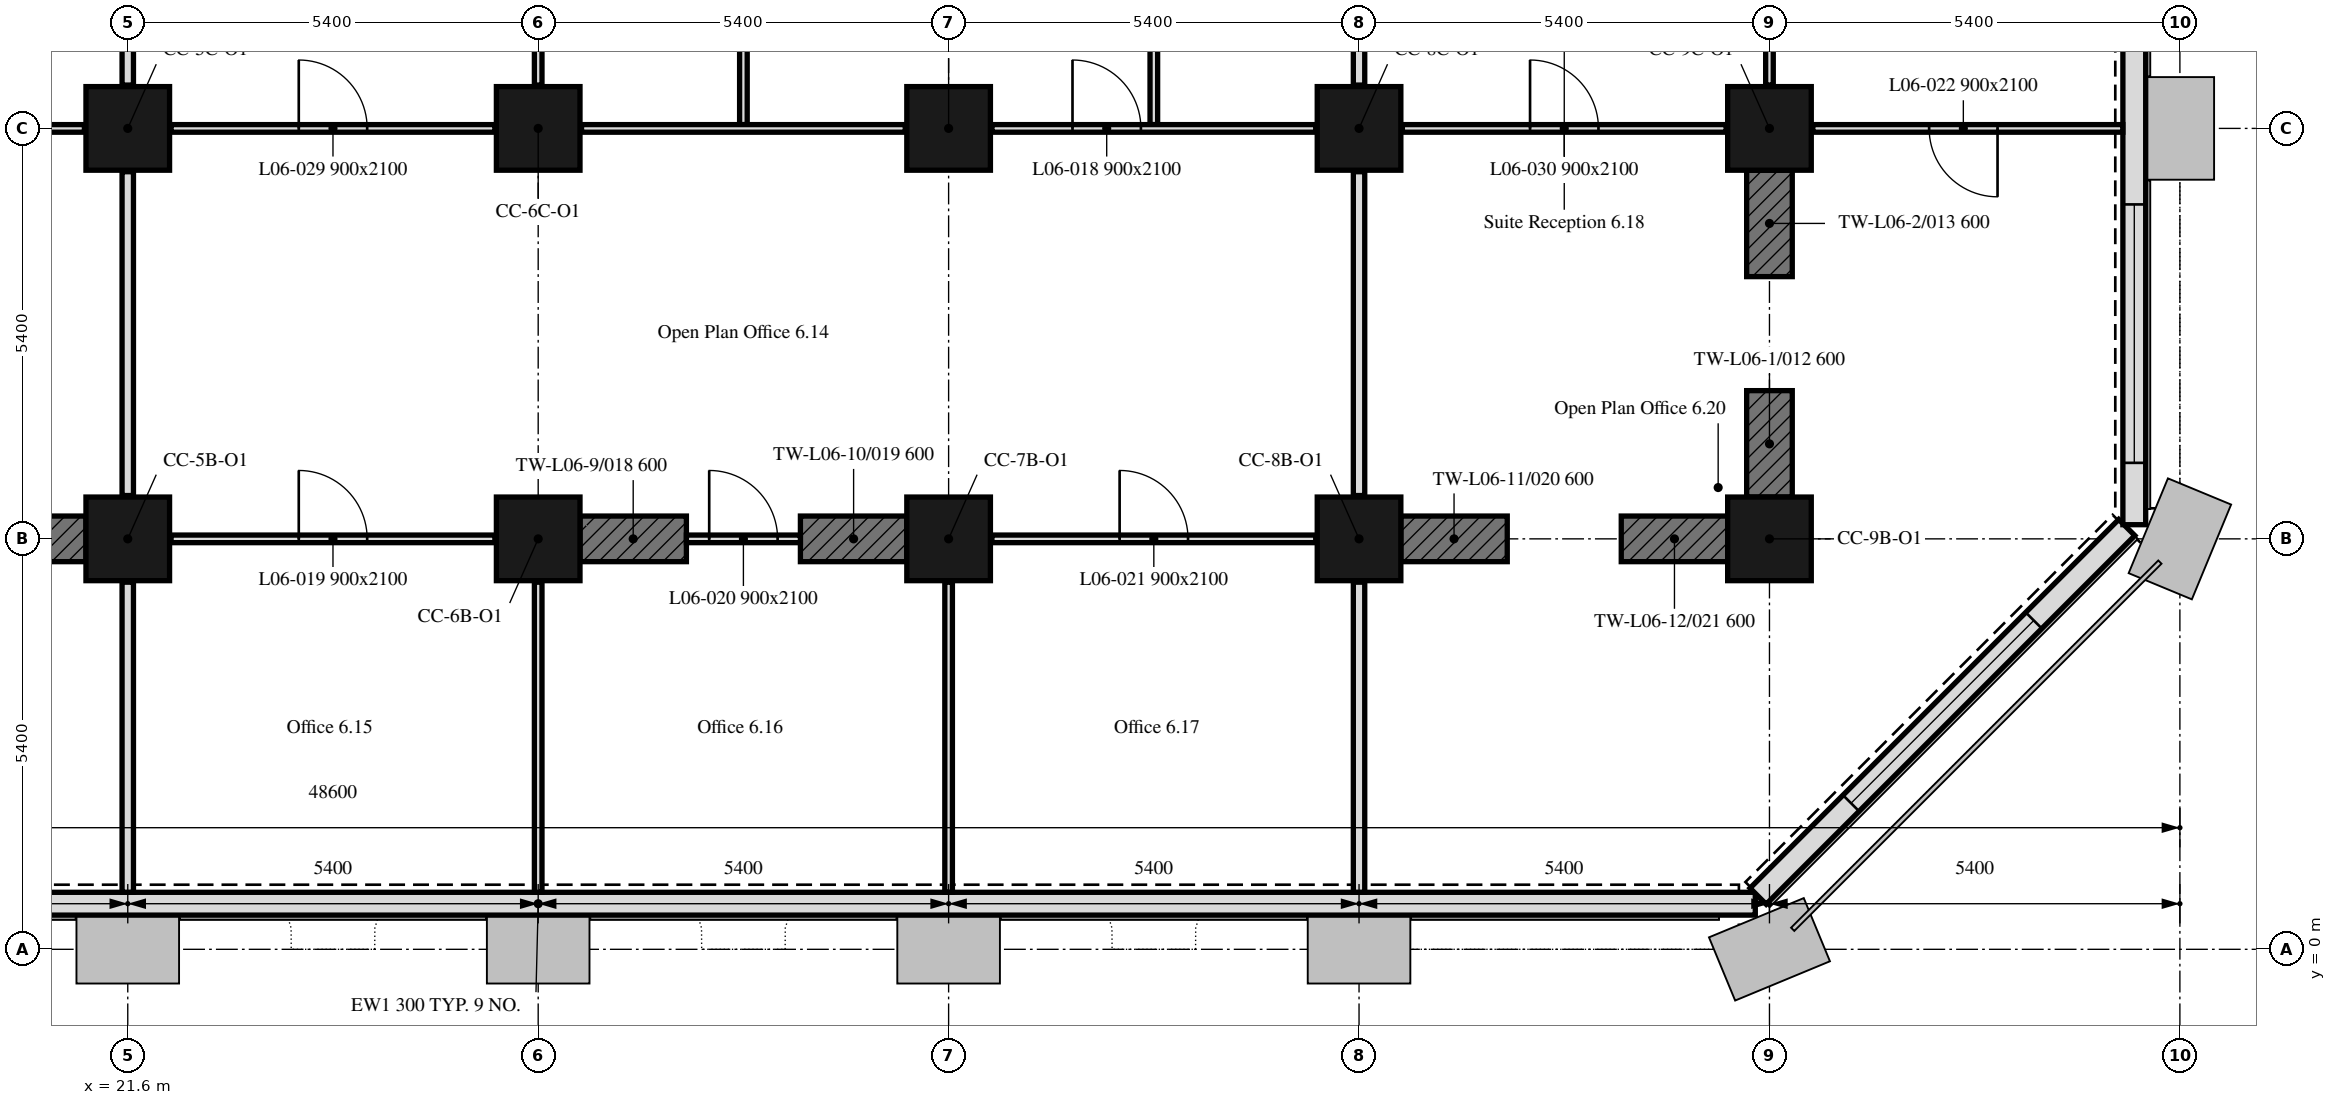
"""IFC4 building model, lengths in metres.
Left out: names, types, materials, properties, quantities, classifications, styles, units other than length and angle.
Written with IfcOpenShell. Run it as: python <this file> out.ifc"""

import sys

from ifc_helpers import new_model, si_unit, direction, frame, frame_2d, origin, origin_2d, place, context, subcontext, project, spatial, rectangle, extrude, element, fill, save


model = new_model("IFC4")
c1 = context("Model", 3, precision=1e-05, world=origin(), true_north=direction((0.0, 1.0)))
c2 = subcontext(c1, "Body", "Model", "MODEL_VIEW")
j1 = project(units=[si_unit("LENGTHUNIT", "METRE"), si_unit("PLANEANGLEUNIT", "RADIAN")], contexts=[c1])
p1 = place(None, origin())
s1 = spatial("IfcSite", under=j1, at=p1, CompositionType="ELEMENT")
p2 = place(p1, origin())
s2 = spatial("IfcBuilding", under=s1, at=p2, CompositionType="ELEMENT")
p3 = place(p2, frame((0.0, 0.0, 33.6)))
s3 = spatial("IfcBuildingStorey", under=s2, at=p3, CompositionType="ELEMENT", Elevation=33.6)
for number, where, z_axis, x_axis in (
    (1, (21.6, 5.4, 0.0), (0.0, 0.0, 1.0), (1.0, 0.0, 0.0)),
    (2, (27.0, 5.4, 0.0), (0.0, 0.0, 1.0), (1.0, 0.0, 0.0)),
    (3, (32.4, 5.4, 0.0), (0.0, 0.0, 1.0), (1.0, 0.0, 0.0)),
    (4, (37.8, 5.4, 0.0), (0.0, 0.0, 1.0), (1.0, 0.0, 0.0)),
    (5, (43.2, 5.4, 0.0), (0.0, 0.0, 1.0), (1.0, 0.0, 0.0)),
    (6, (21.6, 10.8, 0.0), (0.0, 0.0, 1.0), (1.0, 0.0, 0.0)),
    (7, (27.0, 10.8, 0.0), (0.0, 0.0, 1.0), (1.0, 0.0, 0.0)),
    (8, (32.4, 10.8, 0.0), (0.0, 0.0, 1.0), (1.0, 0.0, 0.0)),
    (9, (37.8, 10.8, 0.0), (0.0, 0.0, 1.0), (1.0, 0.0, 0.0)),
    (10, (43.2, 10.8, 0.0), (0.0, 0.0, 1.0), (1.0, 0.0, 0.0)),
):
    element("IfcColumn", number, at=place(p3, frame(where, z_axis=z_axis, x_axis=x_axis)), inside=s3, PredefinedType="COLUMN", context=c2, shape_type="SweptSolid", body=[
        extrude(rectangle(XDim=1.1, YDim=1.1, at=origin_2d()), origin(), (0.0, 0.0, 1.0), 3.5),
    ])
p4 = place(p3, frame((43.2, 5.95, 0.0), z_axis=(0.0, 0.0, 1.0), x_axis=(0.0, 1.0, 0.0)))
e11 = element("IfcWall", 11, at=p4, inside=s3, PredefinedType="SHEAR", context=c2, shape_type="SweptSolid", body=[
    extrude(rectangle(XDim=1.4, YDim=0.6, at=frame_2d((0.7, 0.0))), origin(), (0.0, 0.0, 1.0), 3.5),
])
p5 = place(p3, frame((43.2, 8.85, 0.0), z_axis=(0.0, 0.0, 1.0), x_axis=(0.0, 1.0, 0.0)))
e12 = element("IfcWall", 12, at=p5, inside=s3, PredefinedType="SHEAR", context=c2, shape_type="SweptSolid", body=[
    extrude(rectangle(XDim=1.4, YDim=0.6, at=frame_2d((0.7, 0.0))), origin(), (0.0, 0.0, 1.0), 3.5),
])
p6 = place(p3, frame((19.65, 5.4, 0.0), z_axis=(0.0, 0.0, 1.0), x_axis=(1.0, 0.0, 0.0)))
e13 = element("IfcWall", 13, at=p6, inside=s3, PredefinedType="SHEAR", context=c2, shape_type="SweptSolid", body=[
    extrude(rectangle(XDim=1.4, YDim=0.6, at=frame_2d((0.7, 0.0))), origin(), (0.0, 0.0, 1.0), 3.5),
])
p7 = place(p3, frame((27.55, 5.4, 0.0), z_axis=(0.0, 0.0, 1.0), x_axis=(1.0, 0.0, 0.0)))
e14 = element("IfcWall", 14, at=p7, inside=s3, PredefinedType="SHEAR", context=c2, shape_type="SweptSolid", body=[
    extrude(rectangle(XDim=1.4, YDim=0.6, at=frame_2d((0.7, 0.0))), origin(), (0.0, 0.0, 1.0), 3.5),
])
p8 = place(p3, frame((30.45, 5.4, 0.0), z_axis=(0.0, 0.0, 1.0), x_axis=(1.0, 0.0, 0.0)))
e15 = element("IfcWall", 15, at=p8, inside=s3, PredefinedType="SHEAR", context=c2, shape_type="SweptSolid", body=[
    extrude(rectangle(XDim=1.4, YDim=0.6, at=frame_2d((0.7, 0.0))), origin(), (0.0, 0.0, 1.0), 3.5),
])
for number, where, z_axis, x_axis in (
    (16, (38.35, 5.4, 0.0), (0.0, 0.0, 1.0), (1.0, 0.0, 0.0)),
    (17, (41.25, 5.4, 0.0), (0.0, 0.0, 1.0), (1.0, 0.0, 0.0)),
):
    element("IfcWall", number, at=place(p3, frame(where, z_axis=z_axis, x_axis=x_axis)), inside=s3, PredefinedType="SHEAR", context=c2, shape_type="SweptSolid", body=[
        extrude(rectangle(XDim=1.4, YDim=0.6, at=frame_2d((0.7, 0.0))), origin(), (0.0, 0.0, 1.0), 3.5),
    ])
p9 = place(p3, frame((10.986, 0.6, 0.0), z_axis=(0.0, 0.0, 1.0), x_axis=(1.0, 0.0, 0.0)))
e18 = element("IfcWall", 18, at=p9, inside=s3, PredefinedType="SOLIDWALL", context=c2, shape_type="SweptSolid", body=[
    extrude(rectangle(XDim=32.027, YDim=0.3, at=frame_2d((16.014, 0.0))), origin(), (0.0, 0.0, 1.0), 3.5),
])
p10 = place(p9, frame((0.814, 0.0, 0.9)))
e19 = element("IfcOpeningElement", 19, at=p10, cuts=e18, PredefinedType="OPENING", context=c2, shape_type="SweptSolid", body=[
    extrude(rectangle(XDim=3.4, YDim=1.7, at=frame_2d((1.7, 0.85))), frame((0.0, 0.16, 0.0), z_axis=(0.0, -1.0, 0.0), x_axis=(1.0, 0.0, 0.0)), (0.0, 0.0, 1.0), 0.32),
])
p11 = place(p3, frame((43.051, 0.699, 0.0), z_axis=(0.0, 0.0, 1.0), x_axis=(0.707106781187, 0.707106781187, 0.0)))
e20 = element("IfcWall", 20, at=p11, inside=s3, PredefinedType="SOLIDWALL", context=c2, shape_type="SweptSolid", body=[
    extrude(rectangle(XDim=6.86, YDim=0.3, at=frame_2d((3.43, 0.0))), origin(), (0.0, 0.0, 1.0), 3.5),
])
p12 = place(p11, frame((1.73, 0.0, 0.9)))
e21 = element("IfcOpeningElement", 21, at=p12, cuts=e20, PredefinedType="OPENING", context=c2, shape_type="SweptSolid", body=[
    extrude(rectangle(XDim=3.4, YDim=1.7, at=frame_2d((1.7, 0.85))), frame((0.0, 0.16, 0.0), z_axis=(0.0, -1.0, 0.0), x_axis=(1.0, 0.0, 0.0)), (0.0, 0.0, 1.0), 0.32),
])
p13 = place(p3, frame((48.0, 5.586, 0.0), z_axis=(0.0, 0.0, 1.0), x_axis=(0.0, 1.0, 0.0)))
e22 = element("IfcWall", 22, at=p13, inside=s3, PredefinedType="SOLIDWALL", context=c2, shape_type="SweptSolid", body=[
    extrude(rectangle(XDim=32.027, YDim=0.3, at=frame_2d((16.014, 0.0))), origin(), (0.0, 0.0, 1.0), 3.5),
])
p14 = place(p13, frame((0.814, 0.0, 0.9)))
e23 = element("IfcOpeningElement", 23, at=p14, cuts=e22, PredefinedType="OPENING", context=c2, shape_type="SweptSolid", body=[
    extrude(rectangle(XDim=3.4, YDim=1.7, at=frame_2d((1.7, 0.85))), frame((0.0, 0.16, 0.0), z_axis=(0.0, -1.0, 0.0), x_axis=(1.0, 0.0, 0.0)), (0.0, 0.0, 1.0), 0.32),
])
p15 = place(p3, frame((16.77, 10.8, 0.0), z_axis=(0.0, 0.0, 1.0), x_axis=(1.0, 0.0, 0.0)))
e24 = element("IfcWall", 24, at=p15, inside=s3, PredefinedType="PARTITIONING", context=c2, shape_type="SweptSolid", body=[
    extrude(rectangle(XDim=4.26, YDim=0.1, at=frame_2d((2.13, 0.0))), origin(), (0.0, 0.0, 1.0), 3.5),
])
p16 = place(p3, frame((21.6, 11.37, 0.0), z_axis=(0.0, 0.0, 1.0), x_axis=(0.0, 1.0, 0.0)))
e25 = element("IfcWall", 25, at=p16, inside=s3, PredefinedType="PARTITIONING", context=c2, shape_type="SweptSolid", body=[
    extrude(rectangle(XDim=2.055, YDim=0.15, at=frame_2d((1.027, 0.0))), origin(), (0.0, 0.0, 1.0), 2.75),
])
p17 = place(p3, frame((21.6, 10.23, 0.0), z_axis=(0.0, 0.0, 1.0), x_axis=(0.0, -1.0, 0.0)))
e26 = element("IfcWall", 26, at=p17, inside=s3, PredefinedType="PARTITIONING", context=c2, shape_type="SweptSolid", body=[
    extrude(rectangle(XDim=4.26, YDim=0.15, at=frame_2d((2.13, 0.0))), origin(), (0.0, 0.0, 1.0), 2.75),
])
p18 = place(p3, frame((21.6, 4.83, 0.0), z_axis=(0.0, 0.0, 1.0), x_axis=(0.0, -1.0, 0.0)))
e27 = element("IfcWall", 27, at=p18, inside=s3, PredefinedType="PARTITIONING", context=c2, shape_type="SweptSolid", body=[
    extrude(rectangle(XDim=4.079, YDim=0.15, at=frame_2d((2.04, 0.0))), origin(), (0.0, 0.0, 1.0), 2.75),
])
p19 = place(p3, frame((22.17, 10.8, 0.0), z_axis=(0.0, 0.0, 1.0), x_axis=(1.0, 0.0, 0.0)))
e28 = element("IfcWall", 28, at=p19, inside=s3, PredefinedType="PARTITIONING", context=c2, shape_type="SweptSolid", body=[
    extrude(rectangle(XDim=4.26, YDim=0.1, at=frame_2d((2.13, 0.0))), origin(), (0.0, 0.0, 1.0), 3.5),
])
p20 = place(p19, frame((1.68, 0.0, 0.0)))
e29 = element("IfcOpeningElement", 29, at=p20, cuts=e28, PredefinedType="OPENING", context=c2, shape_type="SweptSolid", body=[
    extrude(rectangle(XDim=0.9, YDim=2.1, at=frame_2d((0.45, 1.05))), frame((0.0, 0.05, 0.0), z_axis=(0.0, -1.0, 0.0), x_axis=(1.0, 0.0, 0.0)), (0.0, 0.0, 1.0), 0.1),
])
p21 = place(p3, frame((27.0, 11.37, 0.0), z_axis=(0.0, 0.0, 1.0), x_axis=(0.0, 1.0, 0.0)))
e30 = element("IfcWall", 30, at=p21, inside=s3, PredefinedType="PARTITIONING", context=c2, shape_type="SweptSolid", body=[
    extrude(rectangle(XDim=2.055, YDim=0.1, at=frame_2d((1.027, 0.0))), origin(), (0.0, 0.0, 1.0), 2.75),
])
p22 = place(p3, frame((29.7, 10.85, 0.0), z_axis=(0.0, 0.0, 1.0), x_axis=(0.0, 1.0, 0.0)))
e31 = element("IfcWall", 31, at=p22, inside=s3, PredefinedType="PARTITIONING", context=c2, shape_type="SweptSolid", body=[
    extrude(rectangle(XDim=2.575, YDim=0.1, at=frame_2d((1.288, 0.0))), origin(), (0.0, 0.0, 1.0), 3.5),
])
p23 = place(p3, frame((27.57, 10.8, 0.0), z_axis=(0.0, 0.0, 1.0), x_axis=(1.0, 0.0, 0.0)))
e32 = element("IfcWall", 32, at=p23, inside=s3, PredefinedType="PARTITIONING", context=c2, shape_type="SweptSolid", body=[
    extrude(rectangle(XDim=4.26, YDim=0.1, at=frame_2d((2.13, 0.0))), origin(), (0.0, 0.0, 1.0), 3.5),
])
p24 = place(p3, frame((35.1, 10.85, 0.0), z_axis=(0.0, 0.0, 1.0), x_axis=(0.0, 1.0, 0.0)))
e33 = element("IfcWall", 33, at=p24, inside=s3, PredefinedType="PARTITIONING", context=c2, shape_type="SweptSolid", body=[
    extrude(rectangle(XDim=2.575, YDim=0.1, at=frame_2d((1.288, 0.0))), origin(), (0.0, 0.0, 1.0), 3.5),
])
p25 = place(p3, frame((32.97, 10.8, 0.0), z_axis=(0.0, 0.0, 1.0), x_axis=(1.0, 0.0, 0.0)))
e34 = element("IfcWall", 34, at=p25, inside=s3, PredefinedType="PARTITIONING", context=c2, shape_type="SweptSolid", body=[
    extrude(rectangle(XDim=4.26, YDim=0.1, at=frame_2d((2.13, 0.0))), origin(), (0.0, 0.0, 1.0), 2.75),
])
p26 = place(p25, frame((1.06, 0.0, 0.0)))
e35 = element("IfcOpeningElement", 35, at=p26, cuts=e34, PredefinedType="OPENING", context=c2, shape_type="SweptSolid", body=[
    extrude(rectangle(XDim=0.9, YDim=2.1, at=frame_2d((0.45, 1.05))), frame((0.0, 0.05, 0.0), z_axis=(0.0, -1.0, 0.0), x_axis=(1.0, 0.0, 0.0)), (0.0, 0.0, 1.0), 0.1),
])
p27 = place(p3, frame((37.8, 11.37, 0.0), z_axis=(0.0, 0.0, 1.0), x_axis=(0.0, 1.0, 0.0)))
e36 = element("IfcWall", 36, at=p27, inside=s3, PredefinedType="PARTITIONING", context=c2, shape_type="SweptSolid", body=[
    extrude(rectangle(XDim=2.055, YDim=0.15, at=frame_2d((1.027, 0.0))), origin(), (0.0, 0.0, 1.0), 2.75),
])
p28 = place(p3, frame((22.17, 5.4, 0.0), z_axis=(0.0, 0.0, 1.0), x_axis=(1.0, 0.0, 0.0)))
e37 = element("IfcWall", 37, at=p28, inside=s3, PredefinedType="PARTITIONING", context=c2, shape_type="SweptSolid", body=[
    extrude(rectangle(XDim=4.26, YDim=0.1, at=frame_2d((2.13, 0.0))), origin(), (0.0, 0.0, 1.0), 3.5),
])
p29 = place(p28, frame((1.68, 0.0, 0.0)))
e38 = element("IfcOpeningElement", 38, at=p29, cuts=e37, PredefinedType="OPENING", context=c2, shape_type="SweptSolid", body=[
    extrude(rectangle(XDim=0.9, YDim=2.1, at=frame_2d((0.45, 1.05))), frame((0.0, 0.05, 0.0), z_axis=(0.0, -1.0, 0.0), x_axis=(1.0, 0.0, 0.0)), (0.0, 0.0, 1.0), 0.1),
])
p30 = place(p3, frame((28.95, 5.4, 0.0), z_axis=(0.0, 0.0, 1.0), x_axis=(1.0, 0.0, 0.0)))
e39 = element("IfcWall", 39, at=p30, inside=s3, PredefinedType="PARTITIONING", context=c2, shape_type="SweptSolid", body=[
    extrude(rectangle(XDim=1.5, YDim=0.1, at=frame_2d((0.75, 0.0))), origin(), (0.0, 0.0, 1.0), 3.5),
])
p31 = place(p30, frame((0.3, 0.0, 0.0)))
e40 = element("IfcOpeningElement", 40, at=p31, cuts=e39, PredefinedType="OPENING", context=c2, shape_type="SweptSolid", body=[
    extrude(rectangle(XDim=0.9, YDim=2.1, at=frame_2d((0.45, 1.05))), frame((0.0, 0.05, 0.0), z_axis=(0.0, -1.0, 0.0), x_axis=(1.0, 0.0, 0.0)), (0.0, 0.0, 1.0), 0.1),
])
p32 = place(p3, frame((32.97, 5.4, 0.0), z_axis=(0.0, 0.0, 1.0), x_axis=(1.0, 0.0, 0.0)))
e41 = element("IfcWall", 41, at=p32, inside=s3, PredefinedType="PARTITIONING", context=c2, shape_type="SweptSolid", body=[
    extrude(rectangle(XDim=4.26, YDim=0.1, at=frame_2d((2.13, 0.0))), origin(), (0.0, 0.0, 1.0), 3.5),
])
p33 = place(p32, frame((1.68, 0.0, 0.0)))
e42 = element("IfcOpeningElement", 42, at=p33, cuts=e41, PredefinedType="OPENING", context=c2, shape_type="SweptSolid", body=[
    extrude(rectangle(XDim=0.9, YDim=2.1, at=frame_2d((0.45, 1.05))), frame((0.0, 0.05, 0.0), z_axis=(0.0, -1.0, 0.0), x_axis=(1.0, 0.0, 0.0)), (0.0, 0.0, 1.0), 0.1),
])
p34 = place(p3, frame((37.8, 5.97, 0.0), z_axis=(0.0, 0.0, 1.0), x_axis=(0.0, 1.0, 0.0)))
e43 = element("IfcWall", 43, at=p34, inside=s3, PredefinedType="PARTITIONING", context=c2, shape_type="SweptSolid", body=[
    extrude(rectangle(XDim=4.26, YDim=0.15, at=frame_2d((2.13, 0.0))), origin(), (0.0, 0.0, 1.0), 2.75),
])
for number, where, z_axis, x_axis in (
    (44, (27.0, 4.83, 0.0), (0.0, 0.0, 1.0), (0.0, -1.0, 0.0)),
    (45, (32.4, 4.83, 0.0), (0.0, 0.0, 1.0), (0.0, -1.0, 0.0)),
):
    element("IfcWall", number, at=place(p3, frame(where, z_axis=z_axis, x_axis=x_axis)), inside=s3, PredefinedType="PARTITIONING", context=c2, shape_type="SweptSolid", body=[
        extrude(rectangle(XDim=4.079, YDim=0.1, at=frame_2d((2.04, 0.0))), origin(), (0.0, 0.0, 1.0), 2.75),
    ])
p35 = place(p3, frame((37.8, 4.83, 0.0), z_axis=(0.0, 0.0, 1.0), x_axis=(0.0, -1.0, 0.0)))
e46 = element("IfcWall", 46, at=p35, inside=s3, PredefinedType="PARTITIONING", context=c2, shape_type="SweptSolid", body=[
    extrude(rectangle(XDim=4.079, YDim=0.15, at=frame_2d((2.04, 0.0))), origin(), (0.0, 0.0, 1.0), 2.75),
])
p36 = place(p3, frame((38.37, 10.8, 0.0), z_axis=(0.0, 0.0, 1.0), x_axis=(1.0, 0.0, 0.0)))
e47 = element("IfcWall", 47, at=p36, inside=s3, PredefinedType="PARTITIONING", context=c2, shape_type="SweptSolid", body=[
    extrude(rectangle(XDim=4.26, YDim=0.1, at=frame_2d((2.13, 0.0))), origin(), (0.0, 0.0, 1.0), 2.75),
])
p37 = place(p36, frame((1.68, 0.0, 0.0)))
e48 = element("IfcOpeningElement", 48, at=p37, cuts=e47, PredefinedType="OPENING", context=c2, shape_type="SweptSolid", body=[
    extrude(rectangle(XDim=0.9, YDim=2.1, at=frame_2d((0.45, 1.05))), frame((0.0, 0.05, 0.0), z_axis=(0.0, -1.0, 0.0), x_axis=(1.0, 0.0, 0.0)), (0.0, 0.0, 1.0), 0.1),
])
p38 = place(p3, frame((43.2, 11.37, 0.0), z_axis=(0.0, 0.0, 1.0), x_axis=(0.0, 1.0, 0.0)))
e49 = element("IfcWall", 49, at=p38, inside=s3, PredefinedType="PARTITIONING", context=c2, shape_type="SweptSolid", body=[
    extrude(rectangle(XDim=2.055, YDim=0.1, at=frame_2d((1.027, 0.0))), origin(), (0.0, 0.0, 1.0), 3.5),
])
p39 = place(p3, frame((47.849, 10.8, 0.0), z_axis=(0.0, 0.0, 1.0), x_axis=(-1.0, 0.0, 0.0)))
e50 = element("IfcWall", 50, at=p39, inside=s3, PredefinedType="PARTITIONING", context=c2, shape_type="SweptSolid", body=[
    extrude(rectangle(XDim=4.079, YDim=0.1, at=frame_2d((2.04, 0.0))), origin(), (0.0, 0.0, 1.0), 2.75),
])
p40 = place(p39, frame((1.648, 0.0, 0.0)))
e51 = element("IfcOpeningElement", 51, at=p40, cuts=e50, PredefinedType="OPENING", context=c2, shape_type="SweptSolid", body=[
    extrude(rectangle(XDim=0.9, YDim=2.1, at=frame_2d((0.45, 1.05))), frame((0.0, 0.05, 0.0), z_axis=(0.0, -1.0, 0.0), x_axis=(1.0, 0.0, 0.0)), (0.0, 0.0, 1.0), 0.1),
])
p41 = place(p12, origin())
e52 = element("IfcWindow", 52, at=p41, inside=s3, PartitioningType="SINGLE_PANEL", PredefinedType="WINDOW", context=c2, shape_type="SweptSolid", body=[
    extrude(rectangle(XDim=3.4, YDim=1.7, at=frame_2d((1.7, 0.85))), frame((0.0, 0.03, 0.0), z_axis=(0.0, -1.0, 0.0), x_axis=(1.0, 0.0, 0.0)), (0.0, 0.0, 1.0), 0.06),
])
fill(e21, e52)
p42 = place(p14, origin())
e53 = element("IfcWindow", 53, at=p42, inside=s3, PartitioningType="SINGLE_PANEL", PredefinedType="WINDOW", context=c2, shape_type="SweptSolid", body=[
    extrude(rectangle(XDim=3.4, YDim=1.7, at=frame_2d((1.7, 0.85))), frame((0.0, 0.03, 0.0), z_axis=(0.0, -1.0, 0.0), x_axis=(1.0, 0.0, 0.0)), (0.0, 0.0, 1.0), 0.06),
])
fill(e23, e53)
p43 = place(p26, origin())
e54 = element("IfcDoor", 54, at=p43, inside=s3, OperationType="SINGLE_SWING_LEFT", PredefinedType="DOOR", context=c2, shape_type="SweptSolid", body=[
    extrude(rectangle(XDim=0.9, YDim=2.1, at=frame_2d((0.45, 1.05))), frame((0.0, 0.025, 0.0), z_axis=(0.0, -1.0, 0.0), x_axis=(1.0, 0.0, 0.0)), (0.0, 0.0, 1.0), 0.05),
])
fill(e35, e54)
p44 = place(p29, origin())
e55 = element("IfcDoor", 55, at=p44, inside=s3, OperationType="SINGLE_SWING_LEFT", PredefinedType="DOOR", context=c2, shape_type="SweptSolid", body=[
    extrude(rectangle(XDim=0.9, YDim=2.1, at=frame_2d((0.45, 1.05))), frame((0.0, 0.025, 0.0), z_axis=(0.0, -1.0, 0.0), x_axis=(1.0, 0.0, 0.0)), (0.0, 0.0, 1.0), 0.05),
])
fill(e38, e55)
p45 = place(p31, origin())
e56 = element("IfcDoor", 56, at=p45, inside=s3, OperationType="SINGLE_SWING_LEFT", PredefinedType="DOOR", context=c2, shape_type="SweptSolid", body=[
    extrude(rectangle(XDim=0.9, YDim=2.1, at=frame_2d((0.45, 1.05))), frame((0.0, 0.025, 0.0), z_axis=(0.0, -1.0, 0.0), x_axis=(1.0, 0.0, 0.0)), (0.0, 0.0, 1.0), 0.05),
])
fill(e40, e56)
p46 = place(p33, origin())
e57 = element("IfcDoor", 57, at=p46, inside=s3, OperationType="SINGLE_SWING_LEFT", PredefinedType="DOOR", context=c2, shape_type="SweptSolid", body=[
    extrude(rectangle(XDim=0.9, YDim=2.1, at=frame_2d((0.45, 1.05))), frame((0.0, 0.025, 0.0), z_axis=(0.0, -1.0, 0.0), x_axis=(1.0, 0.0, 0.0)), (0.0, 0.0, 1.0), 0.05),
])
fill(e42, e57)
p47 = place(p40, origin())
e58 = element("IfcDoor", 58, at=p47, inside=s3, OperationType="SINGLE_SWING_RIGHT", PredefinedType="DOOR", context=c2, shape_type="SweptSolid", body=[
    extrude(rectangle(XDim=0.9, YDim=2.1, at=frame_2d((0.45, 1.05))), frame((0.0, 0.025, 0.0), z_axis=(0.0, -1.0, 0.0), x_axis=(1.0, 0.0, 0.0)), (0.0, 0.0, 1.0), 0.05),
])
fill(e51, e58)
p48 = place(p20, origin())
e59 = element("IfcDoor", 59, at=p48, inside=s3, OperationType="SINGLE_SWING_RIGHT", PredefinedType="DOOR", context=c2, shape_type="SweptSolid", body=[
    extrude(rectangle(XDim=0.9, YDim=2.1, at=frame_2d((0.45, 1.05))), frame((0.0, 0.025, 0.0), z_axis=(0.0, -1.0, 0.0), x_axis=(1.0, 0.0, 0.0)), (0.0, 0.0, 1.0), 0.05),
])
fill(e29, e59)
p49 = place(p37, origin())
e60 = element("IfcDoor", 60, at=p49, inside=s3, OperationType="SINGLE_SWING_LEFT", PredefinedType="DOOR", context=c2, shape_type="SweptSolid", body=[
    extrude(rectangle(XDim=0.9, YDim=2.1, at=frame_2d((0.45, 1.05))), frame((0.0, 0.025, 0.0), z_axis=(0.0, -1.0, 0.0), x_axis=(1.0, 0.0, 0.0)), (0.0, 0.0, 1.0), 0.05),
])
fill(e48, e60)
save(model, sys.argv[1])
